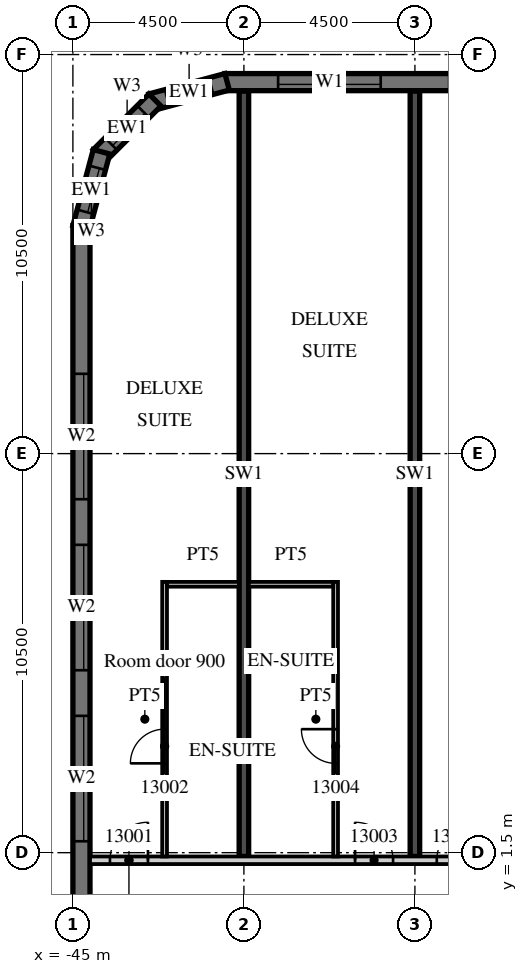
"""IFC4 building model, lengths in metres.
Left out: names, types, materials, properties, quantities, classifications, styles, units other than length and angle.
Written with IfcOpenShell. Run it as: python <this file> out.ifc"""

import sys

from ifc_helpers import new_model, si_unit, direction, frame, frame_2d, origin, place, context, subcontext, project, spatial, polyline, rectangle, outline, extrude, element, fill, save


model = new_model("IFC4")
c1 = context("Model", 3, precision=1e-05, world=origin(), true_north=direction((0.0, 1.0)))
c2 = subcontext(c1, "Body", "Model", "MODEL_VIEW")
j1 = project(units=[si_unit("LENGTHUNIT", "METRE"), si_unit("PLANEANGLEUNIT", "RADIAN")], contexts=[c1])
p1 = place(None, origin())
s1 = spatial("IfcSite", under=j1, at=p1, CompositionType="ELEMENT")
p2 = place(p1, origin())
s2 = spatial("IfcBuilding", under=s1, at=p2, CompositionType="ELEMENT")
p3 = place(p2, frame((0.0, 0.0, 73.2)))
s3 = spatial("IfcBuildingStorey", under=s2, at=p3, CompositionType="ELEMENT", Elevation=73.2)
for number, where, z_axis, x_axis in (
    (1, (-40.5, 1.4, 0.0), (0.0, 0.0, 1.0), (0.0, 1.0, 0.0)),
    (2, (-36.0, 1.4, 0.0), (0.0, 0.0, 1.0), (0.0, 1.0, 0.0)),
):
    element("IfcWall", number, at=place(p3, frame(where, z_axis=z_axis, x_axis=x_axis)), inside=s3, PredefinedType="SHEAR", context=c2, shape_type="SweptSolid", body=[
        extrude(rectangle(XDim=20.14, YDim=0.25, at=frame_2d((10.07, 0.0))), origin(), (0.0, 0.0, 1.0), 3.3),
    ])
p4 = place(p3, frame((13.5, 21.775, 0.0), z_axis=(0.0, 0.0, 1.0), x_axis=(-1.0, 0.0, 0.0)))
e3 = element("IfcWall", 3, at=p4, inside=s3, PredefinedType="SOLIDWALL", context=c2, shape_type="SweptSolid", body=[
    extrude(rectangle(XDim=54.5, YDim=0.45, at=frame_2d((27.25, 0.0))), origin(), (0.0, 0.0, 1.0), 3.02),
])
p5 = place(p4, frame((0.9, 0.0, 0.45)))
e4 = element("IfcOpeningElement", 4, at=p5, cuts=e3, PredefinedType="OPENING", context=c2, shape_type="SweptSolid", body=[
    extrude(rectangle(XDim=2.7, YDim=2.25, at=frame_2d((1.35, 1.125))), frame((0.0, 0.235, 0.0), z_axis=(0.0, -1.0, 0.0), x_axis=(1.0, 0.0, 0.0)), (0.0, 0.0, 1.0), 0.47),
])
p6 = place(p4, frame((5.4, 0.0, 0.45)))
e5 = element("IfcOpeningElement", 5, at=p6, cuts=e3, PredefinedType="OPENING", context=c2, shape_type="SweptSolid", body=[
    extrude(rectangle(XDim=2.7, YDim=2.25, at=frame_2d((1.35, 1.125))), frame((0.0, 0.235, 0.0), z_axis=(0.0, -1.0, 0.0), x_axis=(1.0, 0.0, 0.0)), (0.0, 0.0, 1.0), 0.47),
])
p7 = place(p4, frame((9.9, 0.0, 0.45)))
e6 = element("IfcOpeningElement", 6, at=p7, cuts=e3, PredefinedType="OPENING", context=c2, shape_type="SweptSolid", body=[
    extrude(rectangle(XDim=2.7, YDim=2.25, at=frame_2d((1.35, 1.125))), frame((0.0, 0.235, 0.0), z_axis=(0.0, -1.0, 0.0), x_axis=(1.0, 0.0, 0.0)), (0.0, 0.0, 1.0), 0.47),
])
p8 = place(p4, frame((14.4, 0.0, 0.45)))
e7 = element("IfcOpeningElement", 7, at=p8, cuts=e3, PredefinedType="OPENING", context=c2, shape_type="SweptSolid", body=[
    extrude(rectangle(XDim=2.7, YDim=2.25, at=frame_2d((1.35, 1.125))), frame((0.0, 0.235, 0.0), z_axis=(0.0, -1.0, 0.0), x_axis=(1.0, 0.0, 0.0)), (0.0, 0.0, 1.0), 0.47),
])
p9 = place(p4, frame((18.9, 0.0, 0.45)))
e8 = element("IfcOpeningElement", 8, at=p9, cuts=e3, PredefinedType="OPENING", context=c2, shape_type="SweptSolid", body=[
    extrude(rectangle(XDim=2.7, YDim=2.25, at=frame_2d((1.35, 1.125))), frame((0.0, 0.235, 0.0), z_axis=(0.0, -1.0, 0.0), x_axis=(1.0, 0.0, 0.0)), (0.0, 0.0, 1.0), 0.47),
])
p10 = place(p4, frame((23.4, 0.0, 0.45)))
e9 = element("IfcOpeningElement", 9, at=p10, cuts=e3, PredefinedType="OPENING", context=c2, shape_type="SweptSolid", body=[
    extrude(rectangle(XDim=2.7, YDim=2.25, at=frame_2d((1.35, 1.125))), frame((0.0, 0.235, 0.0), z_axis=(0.0, -1.0, 0.0), x_axis=(1.0, 0.0, 0.0)), (0.0, 0.0, 1.0), 0.47),
])
p11 = place(p4, frame((27.9, 0.0, 0.45)))
e10 = element("IfcOpeningElement", 10, at=p11, cuts=e3, PredefinedType="OPENING", context=c2, shape_type="SweptSolid", body=[
    extrude(rectangle(XDim=2.7, YDim=2.25, at=frame_2d((1.35, 1.125))), frame((0.0, 0.235, 0.0), z_axis=(0.0, -1.0, 0.0), x_axis=(1.0, 0.0, 0.0)), (0.0, 0.0, 1.0), 0.47),
])
p12 = place(p4, frame((32.4, 0.0, 0.45)))
e11 = element("IfcOpeningElement", 11, at=p12, cuts=e3, PredefinedType="OPENING", context=c2, shape_type="SweptSolid", body=[
    extrude(rectangle(XDim=2.7, YDim=2.25, at=frame_2d((1.35, 1.125))), frame((0.0, 0.235, 0.0), z_axis=(0.0, -1.0, 0.0), x_axis=(1.0, 0.0, 0.0)), (0.0, 0.0, 1.0), 0.47),
])
p13 = place(p4, frame((36.9, 0.0, 0.45)))
e12 = element("IfcOpeningElement", 12, at=p13, cuts=e3, PredefinedType="OPENING", context=c2, shape_type="SweptSolid", body=[
    extrude(rectangle(XDim=2.7, YDim=2.25, at=frame_2d((1.35, 1.125))), frame((0.0, 0.235, 0.0), z_axis=(0.0, -1.0, 0.0), x_axis=(1.0, 0.0, 0.0)), (0.0, 0.0, 1.0), 0.47),
])
p14 = place(p4, frame((41.4, 0.0, 0.45)))
e13 = element("IfcOpeningElement", 13, at=p14, cuts=e3, PredefinedType="OPENING", context=c2, shape_type="SweptSolid", body=[
    extrude(rectangle(XDim=2.7, YDim=2.25, at=frame_2d((1.35, 1.125))), frame((0.0, 0.235, 0.0), z_axis=(0.0, -1.0, 0.0), x_axis=(1.0, 0.0, 0.0)), (0.0, 0.0, 1.0), 0.47),
])
p15 = place(p4, frame((45.9, 0.0, 0.45)))
e14 = element("IfcOpeningElement", 14, at=p15, cuts=e3, PredefinedType="OPENING", context=c2, shape_type="SweptSolid", body=[
    extrude(rectangle(XDim=2.7, YDim=2.25, at=frame_2d((1.35, 1.125))), frame((0.0, 0.235, 0.0), z_axis=(0.0, -1.0, 0.0), x_axis=(1.0, 0.0, 0.0)), (0.0, 0.0, 1.0), 0.47),
])
p16 = place(p4, frame((50.4, 0.0, 0.45)))
e15 = element("IfcOpeningElement", 15, at=p16, cuts=e3, PredefinedType="OPENING", context=c2, shape_type="SweptSolid", body=[
    extrude(rectangle(XDim=2.7, YDim=2.25, at=frame_2d((1.35, 1.125))), frame((0.0, 0.235, 0.0), z_axis=(0.0, -1.0, 0.0), x_axis=(1.0, 0.0, 0.0)), (0.0, 0.0, 1.0), 0.47),
])
p17 = place(p3, frame((-40.942, 21.783, 0.0), z_axis=(0.0, 0.0, 1.0), x_axis=(-0.965926999034, -0.25881466832, 0.0)))
e16 = element("IfcWall", 16, at=p17, inside=s3, PredefinedType="SOLIDWALL", context=c2, shape_type="SweptSolid", body=[
    extrude(outline(polyline([(0.0, -0.225), (2.071, -0.225), (1.95, 0.225), (0.121, 0.225), (0.0, -0.225)])), origin(), (0.0, 0.0, 1.0), 3.02),
])
p18 = place(p17, frame((0.435, 0.0, 0.45)))
e17 = element("IfcOpeningElement", 17, at=p18, cuts=e16, PredefinedType="OPENING", context=c2, shape_type="SweptSolid", body=[
    extrude(rectangle(XDim=1.2, YDim=2.25, at=frame_2d((0.6, 1.125))), frame((0.0, 0.235, 0.0), z_axis=(0.0, -1.0, 0.0), x_axis=(1.0, 0.0, 0.0)), (0.0, 0.0, 1.0), 0.47),
])
p19 = place(p3, frame((-42.841, 21.305, 0.0), z_axis=(0.0, 0.0, 1.0), x_axis=(-0.707106781187, -0.707106781187, 0.0)))
e18 = element("IfcWall", 18, at=p19, inside=s3, PredefinedType="SOLIDWALL", context=c2, shape_type="SweptSolid", body=[
    extrude(outline(polyline([(0.0, -0.225), (2.071, -0.225), (1.95, 0.225), (0.121, 0.225), (0.0, -0.225)])), origin(), (0.0, 0.0, 1.0), 3.02),
])
p20 = place(p19, frame((0.435, 0.0, 0.45)))
e19 = element("IfcOpeningElement", 19, at=p20, cuts=e18, PredefinedType="OPENING", context=c2, shape_type="SweptSolid", body=[
    extrude(rectangle(XDim=1.2, YDim=2.25, at=frame_2d((0.6, 1.125))), frame((0.0, 0.235, 0.0), z_axis=(0.0, -1.0, 0.0), x_axis=(1.0, 0.0, 0.0)), (0.0, 0.0, 1.0), 0.47),
])
p21 = place(p3, frame((-44.247, 19.942, 0.0), z_axis=(0.0, 0.0, 1.0), x_axis=(-0.25881466832, -0.965926999034, 0.0)))
e20 = element("IfcWall", 20, at=p21, inside=s3, PredefinedType="SOLIDWALL", context=c2, shape_type="SweptSolid", body=[
    extrude(outline(polyline([(-0.0, -0.225), (2.07, -0.225), (1.95, 0.225), (0.12, 0.225), (-0.0, -0.225)])), origin(), (0.0, 0.0, 1.0), 3.02),
])
p22 = place(p21, frame((0.435, 0.0, 0.45)))
e21 = element("IfcOpeningElement", 21, at=p22, cuts=e20, PredefinedType="OPENING", context=c2, shape_type="SweptSolid", body=[
    extrude(rectangle(XDim=1.2, YDim=2.25, at=frame_2d((0.6, 1.125))), frame((0.0, 0.235, 0.0), z_axis=(0.0, -1.0, 0.0), x_axis=(1.0, 0.0, 0.0)), (0.0, 0.0, 1.0), 0.47),
])
p23 = place(p3, frame((-44.775, 18.0, 0.0), z_axis=(0.0, 0.0, 1.0), x_axis=(0.0, -1.0, 0.0)))
e22 = element("IfcWall", 22, at=p23, inside=s3, PredefinedType="SOLIDWALL", context=c2, shape_type="SweptSolid", body=[
    extrude(rectangle(XDim=36.0, YDim=0.45, at=frame_2d((18.0, 0.0))), origin(), (0.0, 0.0, 1.0), 3.02),
])
p24 = place(p23, frame((3.9, 0.0, 0.45)))
e23 = element("IfcOpeningElement", 23, at=p24, cuts=e22, PredefinedType="OPENING", context=c2, shape_type="SweptSolid", body=[
    extrude(rectangle(XDim=3.3, YDim=2.25, at=frame_2d((1.65, 1.125))), frame((0.0, 0.235, 0.0), z_axis=(0.0, -1.0, 0.0), x_axis=(1.0, 0.0, 0.0)), (0.0, 0.0, 1.0), 0.47),
])
p25 = place(p23, frame((8.4, 0.0, 0.45)))
e24 = element("IfcOpeningElement", 24, at=p25, cuts=e22, PredefinedType="OPENING", context=c2, shape_type="SweptSolid", body=[
    extrude(rectangle(XDim=3.3, YDim=2.25, at=frame_2d((1.65, 1.125))), frame((0.0, 0.235, 0.0), z_axis=(0.0, -1.0, 0.0), x_axis=(1.0, 0.0, 0.0)), (0.0, 0.0, 1.0), 0.47),
])
p26 = place(p23, frame((12.9, 0.0, 0.45)))
e25 = element("IfcOpeningElement", 25, at=p26, cuts=e22, PredefinedType="OPENING", context=c2, shape_type="SweptSolid", body=[
    extrude(rectangle(XDim=3.3, YDim=2.25, at=frame_2d((1.65, 1.125))), frame((0.0, 0.235, 0.0), z_axis=(0.0, -1.0, 0.0), x_axis=(1.0, 0.0, 0.0)), (0.0, 0.0, 1.0), 0.47),
])
p27 = place(p3, frame((-44.55, 1.3, 0.0), z_axis=(0.0, 0.0, 1.0), x_axis=(1.0, 0.0, 0.0)))
e26 = element("IfcWall", 26, at=p27, inside=s3, PredefinedType="PARTITIONING", context=c2, shape_type="SweptSolid", body=[
    extrude(rectangle(XDim=58.05, YDim=0.2, at=frame_2d((29.025, 0.0))), origin(), (0.0, 0.0, 1.0), 3.02),
])
p28 = place(p27, frame((0.525, 0.0, 0.0)))
e27 = element("IfcOpeningElement", 27, at=p28, cuts=e26, PredefinedType="OPENING", context=c2, shape_type="SweptSolid", body=[
    extrude(rectangle(XDim=1.0, YDim=2.1, at=frame_2d((0.5, 1.05))), frame((0.0, 0.11, 0.0), z_axis=(0.0, -1.0, 0.0), x_axis=(1.0, 0.0, 0.0)), (0.0, 0.0, 1.0), 0.22),
])
p29 = place(p27, frame((6.975, 0.0, 0.0)))
e28 = element("IfcOpeningElement", 28, at=p29, cuts=e26, PredefinedType="OPENING", context=c2, shape_type="SweptSolid", body=[
    extrude(rectangle(XDim=1.0, YDim=2.1, at=frame_2d((0.5, 1.05))), frame((0.0, 0.11, 0.0), z_axis=(0.0, -1.0, 0.0), x_axis=(1.0, 0.0, 0.0)), (0.0, 0.0, 1.0), 0.22),
])
p30 = place(p27, frame((9.125, 0.0, 0.0)))
e29 = element("IfcOpeningElement", 29, at=p30, cuts=e26, PredefinedType="OPENING", context=c2, shape_type="SweptSolid", body=[
    extrude(rectangle(XDim=1.0, YDim=2.1, at=frame_2d((0.5, 1.05))), frame((0.0, 0.11, 0.0), z_axis=(0.0, -1.0, 0.0), x_axis=(1.0, 0.0, 0.0)), (0.0, 0.0, 1.0), 0.22),
])
p31 = place(p27, frame((13.6, 0.0, 0.0)))
e30 = element("IfcOpeningElement", 30, at=p31, cuts=e26, PredefinedType="OPENING", context=c2, shape_type="SweptSolid", body=[
    extrude(rectangle(XDim=1.0, YDim=2.1, at=frame_2d((0.5, 1.05))), frame((0.0, 0.11, 0.0), z_axis=(0.0, -1.0, 0.0), x_axis=(1.0, 0.0, 0.0)), (0.0, 0.0, 1.0), 0.22),
])
p32 = place(p27, frame((19.987, 0.0, 0.0)))
e31 = element("IfcOpeningElement", 31, at=p32, cuts=e26, PredefinedType="OPENING", context=c2, shape_type="SweptSolid", body=[
    extrude(rectangle(XDim=1.2, YDim=2.1, at=frame_2d((0.6, 1.05))), frame((0.0, 0.11, 0.0), z_axis=(0.0, -1.0, 0.0), x_axis=(1.0, 0.0, 0.0)), (0.0, 0.0, 1.0), 0.22),
])
p33 = place(p27, frame((31.912, 0.0, 0.0)))
e32 = element("IfcOpeningElement", 32, at=p33, cuts=e26, PredefinedType="OPENING", context=c2, shape_type="SweptSolid", body=[
    extrude(rectangle(XDim=1.2, YDim=2.1, at=frame_2d((0.6, 1.05))), frame((0.0, 0.11, 0.0), z_axis=(0.0, -1.0, 0.0), x_axis=(1.0, 0.0, 0.0)), (0.0, 0.0, 1.0), 0.22),
])
p34 = place(p27, frame((38.5, 0.0, 0.0)))
e33 = element("IfcOpeningElement", 33, at=p34, cuts=e26, PredefinedType="OPENING", context=c2, shape_type="SweptSolid", body=[
    extrude(rectangle(XDim=1.0, YDim=2.1, at=frame_2d((0.5, 1.05))), frame((0.0, 0.11, 0.0), z_axis=(0.0, -1.0, 0.0), x_axis=(1.0, 0.0, 0.0)), (0.0, 0.0, 1.0), 0.22),
])
p35 = place(p27, frame((40.6, 0.0, 0.0)))
e34 = element("IfcOpeningElement", 34, at=p35, cuts=e26, PredefinedType="OPENING", context=c2, shape_type="SweptSolid", body=[
    extrude(rectangle(XDim=1.0, YDim=2.1, at=frame_2d((0.5, 1.05))), frame((0.0, 0.11, 0.0), z_axis=(0.0, -1.0, 0.0), x_axis=(1.0, 0.0, 0.0)), (0.0, 0.0, 1.0), 0.22),
])
p36 = place(p27, frame((47.5, 0.0, 0.0)))
e35 = element("IfcOpeningElement", 35, at=p36, cuts=e26, PredefinedType="OPENING", context=c2, shape_type="SweptSolid", body=[
    extrude(rectangle(XDim=1.0, YDim=2.1, at=frame_2d((0.5, 1.05))), frame((0.0, 0.11, 0.0), z_axis=(0.0, -1.0, 0.0), x_axis=(1.0, 0.0, 0.0)), (0.0, 0.0, 1.0), 0.22),
])
p37 = place(p27, frame((51.975, 0.0, 0.0)))
e36 = element("IfcOpeningElement", 36, at=p37, cuts=e26, PredefinedType="OPENING", context=c2, shape_type="SweptSolid", body=[
    extrude(rectangle(XDim=1.0, YDim=2.1, at=frame_2d((0.5, 1.05))), frame((0.0, 0.11, 0.0), z_axis=(0.0, -1.0, 0.0), x_axis=(1.0, 0.0, 0.0)), (0.0, 0.0, 1.0), 0.22),
])
p38 = place(p27, frame((56.475, 0.0, 0.0)))
e37 = element("IfcOpeningElement", 37, at=p38, cuts=e26, PredefinedType="OPENING", context=c2, shape_type="SweptSolid", body=[
    extrude(rectangle(XDim=1.0, YDim=2.1, at=frame_2d((0.5, 1.05))), frame((0.0, 0.11, 0.0), z_axis=(0.0, -1.0, 0.0), x_axis=(1.0, 0.0, 0.0)), (0.0, 0.0, 1.0), 0.22),
])
p39 = place(p3, frame((-42.587, 1.4, 0.0), z_axis=(0.0, 0.0, 1.0), x_axis=(0.0, 1.0, 0.0)))
e38 = element("IfcWall", 38, at=p39, inside=s3, PredefinedType="PARTITIONING", context=c2, shape_type="SweptSolid", body=[
    extrude(rectangle(XDim=7.225, YDim=0.125, at=frame_2d((3.613, 0.0))), origin(), (0.0, 0.0, 1.0), 3.02),
])
p40 = place(p39, frame((2.45, 0.0, 0.0)))
e39 = element("IfcOpeningElement", 39, at=p40, cuts=e38, PredefinedType="OPENING", context=c2, shape_type="SweptSolid", body=[
    extrude(rectangle(XDim=0.9, YDim=2.1, at=frame_2d((0.45, 1.05))), frame((0.0, 0.073, 0.0), z_axis=(0.0, -1.0, 0.0), x_axis=(1.0, 0.0, 0.0)), (0.0, 0.0, 1.0), 0.145),
])
p41 = place(p3, frame((-42.525, 8.562, 0.0), z_axis=(0.0, 0.0, 1.0), x_axis=(1.0, 0.0, 0.0)))
e40 = element("IfcWall", 40, at=p41, inside=s3, PredefinedType="PARTITIONING", context=c2, shape_type="SweptSolid", body=[
    extrude(rectangle(XDim=1.9, YDim=0.125, at=frame_2d((0.95, 0.0))), origin(), (0.0, 0.0, 1.0), 3.02),
])
p42 = place(p3, frame((-38.087, 1.4, 0.0), z_axis=(0.0, 0.0, 1.0), x_axis=(0.0, 1.0, 0.0)))
e41 = element("IfcWall", 41, at=p42, inside=s3, PredefinedType="PARTITIONING", context=c2, shape_type="SweptSolid", body=[
    extrude(rectangle(XDim=7.225, YDim=0.125, at=frame_2d((3.613, 0.0))), origin(), (0.0, 0.0, 1.0), 3.02),
])
p43 = place(p42, frame((2.45, 0.0, 0.0)))
e42 = element("IfcOpeningElement", 42, at=p43, cuts=e41, PredefinedType="OPENING", context=c2, shape_type="SweptSolid", body=[
    extrude(rectangle(XDim=0.9, YDim=2.1, at=frame_2d((0.45, 1.05))), frame((0.0, 0.073, 0.0), z_axis=(0.0, -1.0, 0.0), x_axis=(1.0, 0.0, 0.0)), (0.0, 0.0, 1.0), 0.145),
])
p44 = place(p3, frame((-40.375, 8.562, 0.0), z_axis=(0.0, 0.0, 1.0), x_axis=(1.0, 0.0, 0.0)))
e43 = element("IfcWall", 43, at=p44, inside=s3, PredefinedType="PARTITIONING", context=c2, shape_type="SweptSolid", body=[
    extrude(rectangle(XDim=2.225, YDim=0.125, at=frame_2d((1.113, 0.0))), origin(), (0.0, 0.0, 1.0), 3.02),
])
p45 = place(p16, origin())
e44 = element("IfcWindow", 44, at=p45, inside=s3, PartitioningType="SINGLE_PANEL", PredefinedType="WINDOW", context=c2, shape_type="SweptSolid", body=[
    extrude(rectangle(XDim=2.7, YDim=2.25, at=frame_2d((1.35, 1.125))), frame((0.0, 0.09, 0.0), z_axis=(0.0, -1.0, 0.0), x_axis=(1.0, 0.0, 0.0)), (0.0, 0.0, 1.0), 0.06),
])
fill(e15, e44)
p46 = place(p18, origin())
e45 = element("IfcWindow", 45, at=p46, inside=s3, PartitioningType="SINGLE_PANEL", PredefinedType="WINDOW", context=c2, shape_type="SweptSolid", body=[
    extrude(rectangle(XDim=1.2, YDim=2.25, at=frame_2d((0.6, 1.125))), frame((0.0, 0.09, 0.0), z_axis=(0.0, -1.0, 0.0), x_axis=(1.0, 0.0, 0.0)), (0.0, 0.0, 1.0), 0.06),
])
fill(e17, e45)
p47 = place(p20, origin())
e46 = element("IfcWindow", 46, at=p47, inside=s3, PartitioningType="SINGLE_PANEL", PredefinedType="WINDOW", context=c2, shape_type="SweptSolid", body=[
    extrude(rectangle(XDim=1.2, YDim=2.25, at=frame_2d((0.6, 1.125))), frame((0.0, 0.09, 0.0), z_axis=(0.0, -1.0, 0.0), x_axis=(1.0, 0.0, 0.0)), (0.0, 0.0, 1.0), 0.06),
])
fill(e19, e46)
p48 = place(p22, origin())
e47 = element("IfcWindow", 47, at=p48, inside=s3, PartitioningType="SINGLE_PANEL", PredefinedType="WINDOW", context=c2, shape_type="SweptSolid", body=[
    extrude(rectangle(XDim=1.2, YDim=2.25, at=frame_2d((0.6, 1.125))), frame((0.0, 0.09, 0.0), z_axis=(0.0, -1.0, 0.0), x_axis=(1.0, 0.0, 0.0)), (0.0, 0.0, 1.0), 0.06),
])
fill(e21, e47)
p49 = place(p24, origin())
e48 = element("IfcWindow", 48, at=p49, inside=s3, PartitioningType="SINGLE_PANEL", PredefinedType="WINDOW", context=c2, shape_type="SweptSolid", body=[
    extrude(rectangle(XDim=3.3, YDim=2.25, at=frame_2d((1.65, 1.125))), frame((0.0, 0.09, 0.0), z_axis=(0.0, -1.0, 0.0), x_axis=(1.0, 0.0, 0.0)), (0.0, 0.0, 1.0), 0.06),
])
fill(e23, e48)
p50 = place(p25, origin())
e49 = element("IfcWindow", 49, at=p50, inside=s3, PartitioningType="SINGLE_PANEL", PredefinedType="WINDOW", context=c2, shape_type="SweptSolid", body=[
    extrude(rectangle(XDim=3.3, YDim=2.25, at=frame_2d((1.65, 1.125))), frame((0.0, 0.09, 0.0), z_axis=(0.0, -1.0, 0.0), x_axis=(1.0, 0.0, 0.0)), (0.0, 0.0, 1.0), 0.06),
])
fill(e24, e49)
p51 = place(p26, origin())
e50 = element("IfcWindow", 50, at=p51, inside=s3, PartitioningType="SINGLE_PANEL", PredefinedType="WINDOW", context=c2, shape_type="SweptSolid", body=[
    extrude(rectangle(XDim=3.3, YDim=2.25, at=frame_2d((1.65, 1.125))), frame((0.0, 0.09, 0.0), z_axis=(0.0, -1.0, 0.0), x_axis=(1.0, 0.0, 0.0)), (0.0, 0.0, 1.0), 0.06),
])
fill(e25, e50)
p52 = place(p28, origin())
e51 = element("IfcDoor", 51, at=p52, inside=s3, OperationType="SINGLE_SWING_RIGHT", PredefinedType="DOOR", context=c2, shape_type="SweptSolid", body=[
    extrude(rectangle(XDim=1.0, YDim=2.1, at=frame_2d((0.5, 1.05))), frame((0.0, 0.025, 0.0), z_axis=(0.0, -1.0, 0.0), x_axis=(1.0, 0.0, 0.0)), (0.0, 0.0, 1.0), 0.05),
])
fill(e27, e51)
p53 = place(p40, origin())
e52 = element("IfcDoor", 52, at=p53, inside=s3, OperationType="SINGLE_SWING_LEFT", PredefinedType="DOOR", context=c2, shape_type="SweptSolid", body=[
    extrude(rectangle(XDim=0.9, YDim=2.1, at=frame_2d((0.45, 1.05))), frame((0.0, 0.025, 0.0), z_axis=(0.0, -1.0, 0.0), x_axis=(1.0, 0.0, 0.0)), (0.0, 0.0, 1.0), 0.05),
])
fill(e39, e52)
p54 = place(p29, origin())
e53 = element("IfcDoor", 53, at=p54, inside=s3, OperationType="SINGLE_SWING_LEFT", PredefinedType="DOOR", context=c2, shape_type="SweptSolid", body=[
    extrude(rectangle(XDim=1.0, YDim=2.1, at=frame_2d((0.5, 1.05))), frame((0.0, 0.025, 0.0), z_axis=(0.0, -1.0, 0.0), x_axis=(1.0, 0.0, 0.0)), (0.0, 0.0, 1.0), 0.05),
])
fill(e28, e53)
p55 = place(p43, origin())
e54 = element("IfcDoor", 54, at=p55, inside=s3, OperationType="SINGLE_SWING_RIGHT", PredefinedType="DOOR", context=c2, shape_type="SweptSolid", body=[
    extrude(rectangle(XDim=0.9, YDim=2.1, at=frame_2d((0.45, 1.05))), frame((0.0, 0.025, 0.0), z_axis=(0.0, -1.0, 0.0), x_axis=(1.0, 0.0, 0.0)), (0.0, 0.0, 1.0), 0.05),
])
fill(e42, e54)
p56 = place(p30, origin())
e55 = element("IfcDoor", 55, at=p56, inside=s3, OperationType="SINGLE_SWING_RIGHT", PredefinedType="DOOR", context=c2, shape_type="SweptSolid", body=[
    extrude(rectangle(XDim=1.0, YDim=2.1, at=frame_2d((0.5, 1.05))), frame((0.0, 0.025, 0.0), z_axis=(0.0, -1.0, 0.0), x_axis=(1.0, 0.0, 0.0)), (0.0, 0.0, 1.0), 0.05),
])
fill(e29, e55)
save(model, sys.argv[1])
